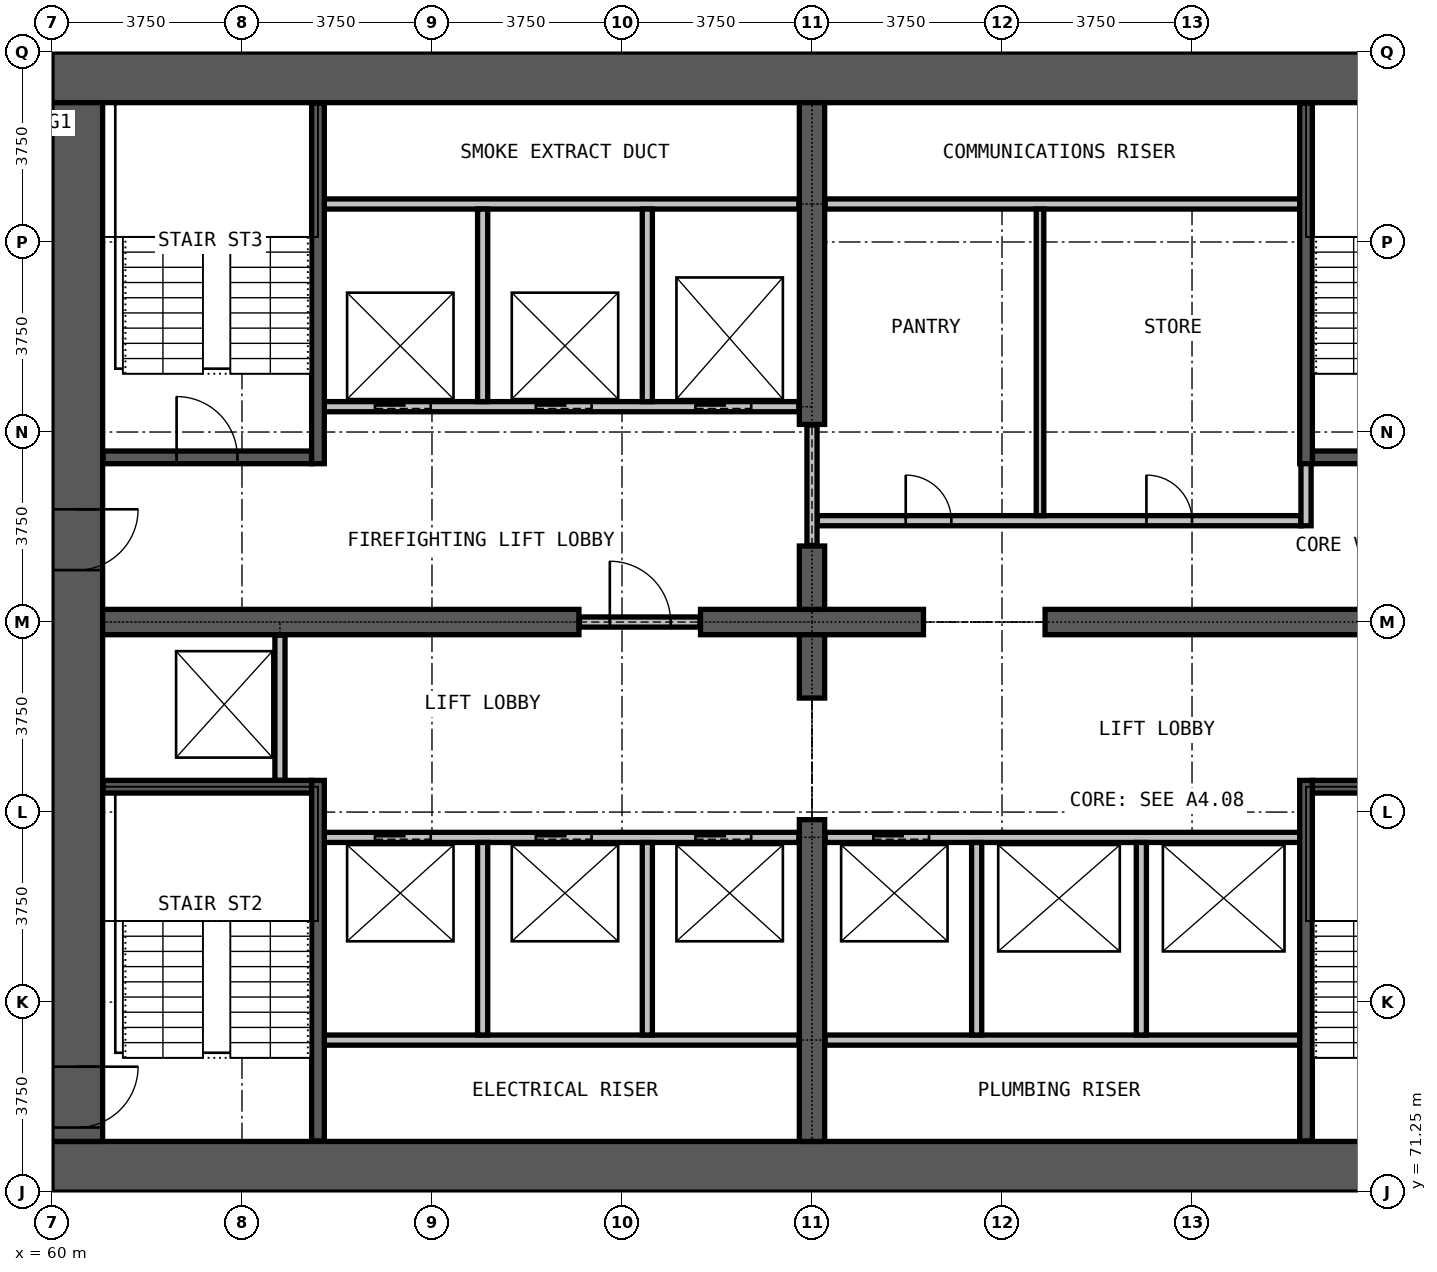
"""IFC4 building model, lengths in metres.
Left out: names, types, materials, properties, quantities, classifications, styles, units other than length and angle.
Written with IfcOpenShell. Run it as: python <this file> out.ifc"""

import sys

from ifc_helpers import new_model, si_unit, direction, frame, frame_2d, origin, place, context, subcontext, project, spatial, rectangle, extrude, element, fill, save


model = new_model("IFC4")
c1 = context("Model", 3, precision=1e-05, world=origin(), true_north=direction((0.0, 1.0)))
c2 = subcontext(c1, "Body", "Model", "MODEL_VIEW")
j1 = project(units=[si_unit("LENGTHUNIT", "METRE"), si_unit("PLANEANGLEUNIT", "RADIAN")], contexts=[c1])
p1 = place(None, origin())
s1 = spatial("IfcSite", under=j1, at=p1, CompositionType="ELEMENT")
p2 = place(p1, origin())
s2 = spatial("IfcBuilding", under=s1, at=p2, CompositionType="ELEMENT")
p3 = place(p2, frame((0.0, 0.0, 59.3)))
s3 = spatial("IfcBuildingStorey", under=s2, at=p3, CompositionType="ELEMENT", Elevation=59.3)
for number, where, z_axis, x_axis in (
    (1, (60.0, 71.75, 0.0), (0.0, 0.0, 1.0), (1.0, 0.0, 0.0)),
    (2, (90.0, 93.25, 0.0), (0.0, 0.0, 1.0), (-1.0, 0.0, 0.0)),
):
    element("IfcWall", number, at=place(p3, frame(where, z_axis=z_axis, x_axis=x_axis)), inside=s3, PredefinedType="SHEAR", context=c2, shape_type="SweptSolid", body=[
        extrude(rectangle(XDim=30.0, YDim=1.0, at=frame_2d((15.0, 0.0))), origin(), (0.0, 0.0, 1.0), 3.3),
    ])
p4 = place(p3, frame((60.5, 92.75, 0.0), z_axis=(0.0, 0.0, 1.0), x_axis=(0.0, -1.0, 0.0)))
e3 = element("IfcWall", 3, at=p4, inside=s3, PredefinedType="SHEAR", context=c2, shape_type="SweptSolid", body=[
    extrude(rectangle(XDim=20.5, YDim=1.0, at=frame_2d((10.25, 0.0))), origin(), (0.0, 0.0, 1.0), 3.3),
])
p5 = place(p4, frame((19.025, 0.0, 0.0)))
e4 = element("IfcOpeningElement", 4, at=p5, cuts=e3, PredefinedType="OPENING", context=c2, shape_type="SweptSolid", body=[
    extrude(rectangle(XDim=1.2, YDim=2.2, at=frame_2d((0.6, 1.1))), frame((0.0, 0.51, 0.0), z_axis=(0.0, -1.0, 0.0), x_axis=(1.0, 0.0, 0.0)), (0.0, 0.0, 1.0), 1.02),
])
p6 = place(p4, frame((8.025, 0.0, 0.0)))
e5 = element("IfcOpeningElement", 5, at=p6, cuts=e3, PredefinedType="OPENING", context=c2, shape_type="SweptSolid", body=[
    extrude(rectangle(XDim=1.2, YDim=2.2, at=frame_2d((0.6, 1.1))), frame((0.0, 0.51, 0.0), z_axis=(0.0, -1.0, 0.0), x_axis=(1.0, 0.0, 0.0)), (0.0, 0.0, 1.0), 1.02),
])
p7 = place(p3, frame((61.0, 82.5, 0.0), z_axis=(0.0, 0.0, 1.0), x_axis=(1.0, 0.0, 0.0)))
e6 = element("IfcWall", 6, at=p7, inside=s3, PredefinedType="SHEAR", context=c2, shape_type="SweptSolid", body=[
    extrude(rectangle(XDim=9.4, YDim=0.5, at=frame_2d((4.7, 0.0))), origin(), (0.0, 0.0, 1.0), 3.3),
])
p8 = place(p3, frame((72.8, 82.5, 0.0), z_axis=(0.0, 0.0, 1.0), x_axis=(1.0, 0.0, 0.0)))
e7 = element("IfcWall", 7, at=p8, inside=s3, PredefinedType="SHEAR", context=c2, shape_type="SweptSolid", body=[
    extrude(rectangle(XDim=4.4, YDim=0.5, at=frame_2d((2.2, 0.0))), origin(), (0.0, 0.0, 1.0), 3.3),
])
p9 = place(p3, frame((79.6, 82.5, 0.0), z_axis=(0.0, 0.0, 1.0), x_axis=(1.0, 0.0, 0.0)))
e8 = element("IfcWall", 8, at=p9, inside=s3, PredefinedType="SHEAR", context=c2, shape_type="SweptSolid", body=[
    extrude(rectangle(XDim=9.4, YDim=0.5, at=frame_2d((4.7, 0.0))), origin(), (0.0, 0.0, 1.0), 3.3),
])
p10 = place(p3, frame((75.0, 72.25, 0.0), z_axis=(0.0, 0.0, 1.0), x_axis=(0.0, 1.0, 0.0)))
e9 = element("IfcWall", 9, at=p10, inside=s3, PredefinedType="SHEAR", context=c2, shape_type="SweptSolid", body=[
    extrude(rectangle(XDim=6.35, YDim=0.5, at=frame_2d((3.175, 0.0))), origin(), (0.0, 0.0, 1.0), 3.3),
])
for number, where, z_axis, x_axis in (
    (10, (75.0, 81.0, 0.0), (0.0, 0.0, 1.0), (0.0, 1.0, 0.0)),
    (11, (75.0, 82.75, 0.0), (0.0, 0.0, 1.0), (0.0, 1.0, 0.0)),
):
    element("IfcWall", number, at=place(p3, frame(where, z_axis=z_axis, x_axis=x_axis)), inside=s3, PredefinedType="SHEAR", context=c2, shape_type="SweptSolid", body=[
        extrude(rectangle(XDim=1.25, YDim=0.5, at=frame_2d((0.625, 0.0))), origin(), (0.0, 0.0, 1.0), 3.3),
    ])
p11 = place(p3, frame((75.0, 86.4, 0.0), z_axis=(0.0, 0.0, 1.0), x_axis=(0.0, 1.0, 0.0)))
e12 = element("IfcWall", 12, at=p11, inside=s3, PredefinedType="SHEAR", context=c2, shape_type="SweptSolid", body=[
    extrude(rectangle(XDim=6.35, YDim=0.5, at=frame_2d((3.175, 0.0))), origin(), (0.0, 0.0, 1.0), 3.3),
])
p12 = place(p3, frame((70.41, 82.5, 0.0), z_axis=(0.0, 0.0, 1.0), x_axis=(1.0, 0.0, 0.0)))
e13 = element("IfcWall", 13, at=p12, inside=s3, PredefinedType="PARTITIONING", context=c2, shape_type="SweptSolid", body=[
    extrude(rectangle(XDim=2.38, YDim=0.2, at=frame_2d((1.19, 0.0))), origin(), (0.0, 0.0, 1.0), 2.4),
])
p13 = place(p12, frame((0.6, 0.0, 0.0)))
e14 = element("IfcOpeningElement", 14, at=p13, cuts=e13, PredefinedType="OPENING", context=c2, shape_type="SweptSolid", body=[
    extrude(rectangle(XDim=1.2, YDim=2.2, at=frame_2d((0.6, 1.1))), frame((0.0, 0.11, 0.0), z_axis=(0.0, -1.0, 0.0), x_axis=(1.0, 0.0, 0.0)), (0.0, 0.0, 1.0), 0.22),
])
p14 = place(p3, frame((75.1, 84.5, 0.0), z_axis=(0.0, 0.0, 1.0), x_axis=(1.0, 0.0, 0.0)))
e15 = element("IfcWall", 15, at=p14, inside=s3, PredefinedType="PARTITIONING", context=c2, shape_type="SweptSolid", body=[
    extrude(rectangle(XDim=9.55, YDim=0.2, at=frame_2d((4.775, 0.0))), origin(), (0.0, 0.0, 1.0), 3.0),
])
p15 = place(p14, frame((1.75, 0.0, 0.0)))
e16 = element("IfcOpeningElement", 16, at=p15, cuts=e15, PredefinedType="OPENING", context=c2, shape_type="SweptSolid", body=[
    extrude(rectangle(XDim=0.9, YDim=2.2, at=frame_2d((0.45, 1.1))), frame((0.0, 0.11, 0.0), z_axis=(0.0, -1.0, 0.0), x_axis=(1.0, 0.0, 0.0)), (0.0, 0.0, 1.0), 0.22),
])
p16 = place(p14, frame((6.5, 0.0, 0.0)))
e17 = element("IfcOpeningElement", 17, at=p16, cuts=e15, PredefinedType="OPENING", context=c2, shape_type="SweptSolid", body=[
    extrude(rectangle(XDim=0.9, YDim=2.2, at=frame_2d((0.45, 1.1))), frame((0.0, 0.11, 0.0), z_axis=(0.0, -1.0, 0.0), x_axis=(1.0, 0.0, 0.0)), (0.0, 0.0, 1.0), 0.22),
])
p17 = place(p3, frame((75.26, 90.75, 0.0), z_axis=(0.0, 0.0, 1.0), x_axis=(1.0, 0.0, 0.0)))
e18 = element("IfcWall", 18, at=p17, inside=s3, PredefinedType="PARTITIONING", context=c2, shape_type="SweptSolid", body=[
    extrude(rectangle(XDim=9.365, YDim=0.2, at=frame_2d((4.683, 0.0))), origin(), (0.0, 0.0, 1.0), 3.0),
])
p18 = place(p3, frame((75.0, 84.01, 0.0), z_axis=(0.0, 0.0, 1.0), x_axis=(0.0, 1.0, 0.0)))
e19 = element("IfcWall", 19, at=p18, inside=s3, PredefinedType="PARTITIONING", context=c2, shape_type="SweptSolid", body=[
    extrude(rectangle(XDim=2.38, YDim=0.2, at=frame_2d((1.19, 0.0))), origin(), (0.0, 0.0, 1.0), 2.4),
])
p19 = place(p3, frame((84.75, 84.4, 0.0), z_axis=(0.0, 0.0, 1.0), x_axis=(0.0, 1.0, 0.0)))
e20 = element("IfcWall", 20, at=p19, inside=s3, PredefinedType="PARTITIONING", context=c2, shape_type="SweptSolid", body=[
    extrude(rectangle(XDim=1.475, YDim=0.2, at=frame_2d((0.738, 0.0))), origin(), (0.0, 0.0, 1.0), 3.0),
])
p20 = place(p3, frame((79.5, 84.6, 0.0), z_axis=(0.0, 0.0, 1.0), x_axis=(0.0, 1.0, 0.0)))
e21 = element("IfcWall", 21, at=p20, inside=s3, PredefinedType="PARTITIONING", context=c2, shape_type="SweptSolid", body=[
    extrude(rectangle(XDim=6.05, YDim=0.15, at=frame_2d((3.025, 0.0))), origin(), (0.0, 0.0, 1.0), 3.0),
])
for number, where, z_axis, x_axis in (
    (22, (65.375, 74.25, 0.0), (0.0, 0.0, 1.0), (1.0, 0.0, 0.0)),
    (23, (75.26, 74.25, 0.0), (0.0, 0.0, 1.0), (1.0, 0.0, 0.0)),
):
    element("IfcWall", number, at=place(p3, frame(where, z_axis=z_axis, x_axis=x_axis)), inside=s3, PredefinedType="PARTITIONING", context=c2, shape_type="SweptSolid", body=[
        extrude(rectangle(XDim=9.365, YDim=0.2, at=frame_2d((4.683, 0.0))), origin(), (0.0, 0.0, 1.0), 3.0),
    ])
p21 = place(p3, frame((65.375, 78.25, 0.0), z_axis=(0.0, 0.0, 1.0), x_axis=(1.0, 0.0, 0.0)))
e24 = element("IfcWall", 24, at=p21, inside=s3, PredefinedType="PARTITIONING", context=c2, shape_type="SweptSolid", body=[
    extrude(rectangle(XDim=9.365, YDim=0.2, at=frame_2d((4.683, 0.0))), origin(), (0.0, 0.0, 1.0), 3.0),
])
p22 = place(p21, frame((1.0, 0.0, 0.0)))
e25 = element("IfcOpeningElement", 25, at=p22, cuts=e24, PredefinedType="OPENING", context=c2, shape_type="SweptSolid", body=[
    extrude(rectangle(XDim=1.1, YDim=2.2, at=frame_2d((0.55, 1.1))), frame((0.0, 0.11, 0.0), z_axis=(0.0, -1.0, 0.0), x_axis=(1.0, 0.0, 0.0)), (0.0, 0.0, 1.0), 0.22),
])
p23 = place(p21, frame((4.175, 0.0, 0.0)))
e26 = element("IfcOpeningElement", 26, at=p23, cuts=e24, PredefinedType="OPENING", context=c2, shape_type="SweptSolid", body=[
    extrude(rectangle(XDim=1.1, YDim=2.2, at=frame_2d((0.55, 1.1))), frame((0.0, 0.11, 0.0), z_axis=(0.0, -1.0, 0.0), x_axis=(1.0, 0.0, 0.0)), (0.0, 0.0, 1.0), 0.22),
])
p24 = place(p21, frame((7.325, 0.0, 0.0)))
e27 = element("IfcOpeningElement", 27, at=p24, cuts=e24, PredefinedType="OPENING", context=c2, shape_type="SweptSolid", body=[
    extrude(rectangle(XDim=1.1, YDim=2.2, at=frame_2d((0.55, 1.1))), frame((0.0, 0.11, 0.0), z_axis=(0.0, -1.0, 0.0), x_axis=(1.0, 0.0, 0.0)), (0.0, 0.0, 1.0), 0.22),
])
p25 = place(p3, frame((75.26, 78.25, 0.0), z_axis=(0.0, 0.0, 1.0), x_axis=(1.0, 0.0, 0.0)))
e28 = element("IfcWall", 28, at=p25, inside=s3, PredefinedType="PARTITIONING", context=c2, shape_type="SweptSolid", body=[
    extrude(rectangle(XDim=9.365, YDim=0.2, at=frame_2d((4.683, 0.0))), origin(), (0.0, 0.0, 1.0), 3.0),
])
p26 = place(p25, frame((0.95, 0.0, 0.0)))
e29 = element("IfcOpeningElement", 29, at=p26, cuts=e28, PredefinedType="OPENING", context=c2, shape_type="SweptSolid", body=[
    extrude(rectangle(XDim=1.1, YDim=2.2, at=frame_2d((0.55, 1.1))), frame((0.0, 0.11, 0.0), z_axis=(0.0, -1.0, 0.0), x_axis=(1.0, 0.0, 0.0)), (0.0, 0.0, 1.0), 0.22),
])
p27 = place(p3, frame((65.375, 86.75, 0.0), z_axis=(0.0, 0.0, 1.0), x_axis=(1.0, 0.0, 0.0)))
e30 = element("IfcWall", 30, at=p27, inside=s3, PredefinedType="PARTITIONING", context=c2, shape_type="SweptSolid", body=[
    extrude(rectangle(XDim=9.365, YDim=0.2, at=frame_2d((4.683, 0.0))), origin(), (0.0, 0.0, 1.0), 3.0),
])
p28 = place(p27, frame((1.0, 0.0, 0.0)))
e31 = element("IfcOpeningElement", 31, at=p28, cuts=e30, PredefinedType="OPENING", context=c2, shape_type="SweptSolid", body=[
    extrude(rectangle(XDim=1.1, YDim=2.2, at=frame_2d((0.55, 1.1))), frame((0.0, 0.11, 0.0), z_axis=(0.0, -1.0, 0.0), x_axis=(1.0, 0.0, 0.0)), (0.0, 0.0, 1.0), 0.22),
])
p29 = place(p27, frame((4.175, 0.0, 0.0)))
e32 = element("IfcOpeningElement", 32, at=p29, cuts=e30, PredefinedType="OPENING", context=c2, shape_type="SweptSolid", body=[
    extrude(rectangle(XDim=1.1, YDim=2.2, at=frame_2d((0.55, 1.1))), frame((0.0, 0.11, 0.0), z_axis=(0.0, -1.0, 0.0), x_axis=(1.0, 0.0, 0.0)), (0.0, 0.0, 1.0), 0.22),
])
p30 = place(p27, frame((7.325, 0.0, 0.0)))
e33 = element("IfcOpeningElement", 33, at=p30, cuts=e30, PredefinedType="OPENING", context=c2, shape_type="SweptSolid", body=[
    extrude(rectangle(XDim=1.1, YDim=2.2, at=frame_2d((0.55, 1.1))), frame((0.0, 0.11, 0.0), z_axis=(0.0, -1.0, 0.0), x_axis=(1.0, 0.0, 0.0)), (0.0, 0.0, 1.0), 0.22),
])
p31 = place(p3, frame((65.375, 90.75, 0.0), z_axis=(0.0, 0.0, 1.0), x_axis=(1.0, 0.0, 0.0)))
e34 = element("IfcWall", 34, at=p31, inside=s3, PredefinedType="PARTITIONING", context=c2, shape_type="SweptSolid", body=[
    extrude(rectangle(XDim=9.365, YDim=0.2, at=frame_2d((4.683, 0.0))), origin(), (0.0, 0.0, 1.0), 3.0),
])
p32 = place(p3, frame((64.5, 79.375, 0.0), z_axis=(0.0, 0.0, 1.0), x_axis=(0.0, 1.0, 0.0)))
e35 = element("IfcWall", 35, at=p32, inside=s3, PredefinedType="PARTITIONING", context=c2, shape_type="SweptSolid", body=[
    extrude(rectangle(XDim=2.865, YDim=0.2, at=frame_2d((1.433, 0.0))), origin(), (0.0, 0.0, 1.0), 3.0),
])
for number, where, z_axis, x_axis in (
    (36, (68.5, 74.35, 0.0), (0.0, 0.0, 1.0), (0.0, 1.0, 0.0)),
    (37, (68.5, 86.85, 0.0), (0.0, 0.0, 1.0), (0.0, 1.0, 0.0)),
    (38, (71.75, 74.35, 0.0), (0.0, 0.0, 1.0), (0.0, 1.0, 0.0)),
    (39, (71.75, 86.85, 0.0), (0.0, 0.0, 1.0), (0.0, 1.0, 0.0)),
    (40, (78.25, 74.35, 0.0), (0.0, 0.0, 1.0), (0.0, 1.0, 0.0)),
    (41, (81.5, 74.35, 0.0), (0.0, 0.0, 1.0), (0.0, 1.0, 0.0)),
):
    element("IfcWall", number, at=place(p3, frame(where, z_axis=z_axis, x_axis=x_axis)), inside=s3, PredefinedType="PARTITIONING", context=c2, shape_type="SweptSolid", body=[
        extrude(rectangle(XDim=3.8, YDim=0.2, at=frame_2d((1.9, 0.0))), origin(), (0.0, 0.0, 1.0), 3.0),
    ])
for number, where, z_axis, x_axis in (
    (42, (61.01, 79.25, 0.0), (0.0, 0.0, 1.0), (1.0, 0.0, 0.0)),
    (43, (84.875, 79.25, 0.0), (0.0, 0.0, 1.0), (1.0, 0.0, 0.0)),
):
    element("IfcWall", number, at=place(p3, frame(where, z_axis=z_axis, x_axis=x_axis)), inside=s3, PredefinedType="PARTITIONING", context=c2, shape_type="SweptSolid", body=[
        extrude(rectangle(XDim=4.115, YDim=0.25, at=frame_2d((2.058, 0.0))), origin(), (0.0, 0.0, 1.0), 3.0),
    ])
p33 = place(p3, frame((61.01, 85.75, 0.0), z_axis=(0.0, 0.0, 1.0), x_axis=(1.0, 0.0, 0.0)))
e44 = element("IfcWall", 44, at=p33, inside=s3, PredefinedType="PARTITIONING", context=c2, shape_type="SweptSolid", body=[
    extrude(rectangle(XDim=4.115, YDim=0.25, at=frame_2d((2.058, 0.0))), origin(), (0.0, 0.0, 1.0), 3.0),
])
p34 = place(p33, frame((1.45, 0.0, 0.0)))
e45 = element("IfcOpeningElement", 45, at=p34, cuts=e44, PredefinedType="OPENING", context=c2, shape_type="SweptSolid", body=[
    extrude(rectangle(XDim=1.2, YDim=2.2, at=frame_2d((0.6, 1.1))), frame((0.0, 0.135, 0.0), z_axis=(0.0, -1.0, 0.0), x_axis=(1.0, 0.0, 0.0)), (0.0, 0.0, 1.0), 0.27),
])
p35 = place(p3, frame((84.875, 85.75, 0.0), z_axis=(0.0, 0.0, 1.0), x_axis=(1.0, 0.0, 0.0)))
e46 = element("IfcWall", 46, at=p35, inside=s3, PredefinedType="PARTITIONING", context=c2, shape_type="SweptSolid", body=[
    extrude(rectangle(XDim=4.115, YDim=0.25, at=frame_2d((2.058, 0.0))), origin(), (0.0, 0.0, 1.0), 3.0),
])
for number, where, z_axis, x_axis in (
    (47, (65.25, 72.26, 0.0), (0.0, 0.0, 1.0), (0.0, 1.0, 0.0)),
    (48, (65.25, 85.625, 0.0), (0.0, 0.0, 1.0), (0.0, 1.0, 0.0)),
    (49, (84.75, 72.26, 0.0), (0.0, 0.0, 1.0), (0.0, 1.0, 0.0)),
    (50, (84.75, 85.625, 0.0), (0.0, 0.0, 1.0), (0.0, 1.0, 0.0)),
):
    element("IfcWall", number, at=place(p3, frame(where, z_axis=z_axis, x_axis=x_axis)), inside=s3, PredefinedType="PARTITIONING", context=c2, shape_type="SweptSolid", body=[
        extrude(rectangle(XDim=7.115, YDim=0.25, at=frame_2d((3.558, 0.0))), origin(), (0.0, 0.0, 1.0), 3.0),
    ])
p36 = place(p22, origin())
e51 = element("IfcDoor", 51, at=p36, inside=s3, OperationType="DOUBLE_DOOR_SLIDING", PredefinedType="DOOR", context=c2, shape_type="SweptSolid", body=[
    extrude(rectangle(XDim=1.1, YDim=2.2, at=frame_2d((0.55, 1.1))), frame((0.0, 0.025, 0.0), z_axis=(0.0, -1.0, 0.0), x_axis=(1.0, 0.0, 0.0)), (0.0, 0.0, 1.0), 0.05),
])
fill(e25, e51)
p37 = place(p23, origin())
e52 = element("IfcDoor", 52, at=p37, inside=s3, OperationType="DOUBLE_DOOR_SLIDING", PredefinedType="DOOR", context=c2, shape_type="SweptSolid", body=[
    extrude(rectangle(XDim=1.1, YDim=2.2, at=frame_2d((0.55, 1.1))), frame((0.0, 0.025, 0.0), z_axis=(0.0, -1.0, 0.0), x_axis=(1.0, 0.0, 0.0)), (0.0, 0.0, 1.0), 0.05),
])
fill(e26, e52)
p38 = place(p24, origin())
e53 = element("IfcDoor", 53, at=p38, inside=s3, OperationType="DOUBLE_DOOR_SLIDING", PredefinedType="DOOR", context=c2, shape_type="SweptSolid", body=[
    extrude(rectangle(XDim=1.1, YDim=2.2, at=frame_2d((0.55, 1.1))), frame((0.0, 0.025, 0.0), z_axis=(0.0, -1.0, 0.0), x_axis=(1.0, 0.0, 0.0)), (0.0, 0.0, 1.0), 0.05),
])
fill(e27, e53)
p39 = place(p26, origin())
e54 = element("IfcDoor", 54, at=p39, inside=s3, OperationType="DOUBLE_DOOR_SLIDING", PredefinedType="DOOR", context=c2, shape_type="SweptSolid", body=[
    extrude(rectangle(XDim=1.1, YDim=2.2, at=frame_2d((0.55, 1.1))), frame((0.0, 0.025, 0.0), z_axis=(0.0, -1.0, 0.0), x_axis=(1.0, 0.0, 0.0)), (0.0, 0.0, 1.0), 0.05),
])
fill(e29, e54)
p40 = place(p28, origin())
e55 = element("IfcDoor", 55, at=p40, inside=s3, OperationType="DOUBLE_DOOR_SLIDING", PredefinedType="DOOR", context=c2, shape_type="SweptSolid", body=[
    extrude(rectangle(XDim=1.1, YDim=2.2, at=frame_2d((0.55, 1.1))), frame((0.0, 0.025, 0.0), z_axis=(0.0, -1.0, 0.0), x_axis=(1.0, 0.0, 0.0)), (0.0, 0.0, 1.0), 0.05),
])
fill(e31, e55)
p41 = place(p29, origin())
e56 = element("IfcDoor", 56, at=p41, inside=s3, OperationType="DOUBLE_DOOR_SLIDING", PredefinedType="DOOR", context=c2, shape_type="SweptSolid", body=[
    extrude(rectangle(XDim=1.1, YDim=2.2, at=frame_2d((0.55, 1.1))), frame((0.0, 0.025, 0.0), z_axis=(0.0, -1.0, 0.0), x_axis=(1.0, 0.0, 0.0)), (0.0, 0.0, 1.0), 0.05),
])
fill(e32, e56)
p42 = place(p30, origin())
e57 = element("IfcDoor", 57, at=p42, inside=s3, OperationType="DOUBLE_DOOR_SLIDING", PredefinedType="DOOR", context=c2, shape_type="SweptSolid", body=[
    extrude(rectangle(XDim=1.1, YDim=2.2, at=frame_2d((0.55, 1.1))), frame((0.0, 0.025, 0.0), z_axis=(0.0, -1.0, 0.0), x_axis=(1.0, 0.0, 0.0)), (0.0, 0.0, 1.0), 0.05),
])
fill(e33, e57)
p43 = place(p13, origin())
e58 = element("IfcDoor", 58, at=p43, inside=s3, OperationType="SINGLE_SWING_RIGHT", PredefinedType="DOOR", context=c2, shape_type="SweptSolid", body=[
    extrude(rectangle(XDim=1.2, YDim=2.2, at=frame_2d((0.6, 1.1))), frame((0.0, 0.025, 0.0), z_axis=(0.0, -1.0, 0.0), x_axis=(1.0, 0.0, 0.0)), (0.0, 0.0, 1.0), 0.05),
])
fill(e14, e58)
p44 = place(p34, origin())
e59 = element("IfcDoor", 59, at=p44, inside=s3, OperationType="SINGLE_SWING_LEFT", PredefinedType="DOOR", context=c2, shape_type="SweptSolid", body=[
    extrude(rectangle(XDim=1.2, YDim=2.2, at=frame_2d((0.6, 1.1))), frame((0.0, 0.025, 0.0), z_axis=(0.0, -1.0, 0.0), x_axis=(1.0, 0.0, 0.0)), (0.0, 0.0, 1.0), 0.05),
])
fill(e45, e59)
p45 = place(p5, origin())
e60 = element("IfcDoor", 60, at=p45, inside=s3, OperationType="SINGLE_SWING_LEFT", PredefinedType="DOOR", context=c2, shape_type="SweptSolid", body=[
    extrude(rectangle(XDim=1.2, YDim=2.2, at=frame_2d((0.6, 1.1))), frame((0.0, 0.025, 0.0), z_axis=(0.0, -1.0, 0.0), x_axis=(1.0, 0.0, 0.0)), (0.0, 0.0, 1.0), 0.05),
])
fill(e4, e60)
p46 = place(p6, origin())
e61 = element("IfcDoor", 61, at=p46, inside=s3, OperationType="SINGLE_SWING_LEFT", PredefinedType="DOOR", context=c2, shape_type="SweptSolid", body=[
    extrude(rectangle(XDim=1.2, YDim=2.2, at=frame_2d((0.6, 1.1))), frame((0.0, 0.025, 0.0), z_axis=(0.0, -1.0, 0.0), x_axis=(1.0, 0.0, 0.0)), (0.0, 0.0, 1.0), 0.05),
])
fill(e5, e61)
p47 = place(p15, origin())
e62 = element("IfcDoor", 62, at=p47, inside=s3, OperationType="SINGLE_SWING_RIGHT", PredefinedType="DOOR", context=c2, shape_type="SweptSolid", body=[
    extrude(rectangle(XDim=0.9, YDim=2.2, at=frame_2d((0.45, 1.1))), frame((0.0, 0.025, 0.0), z_axis=(0.0, -1.0, 0.0), x_axis=(1.0, 0.0, 0.0)), (0.0, 0.0, 1.0), 0.05),
])
fill(e16, e62)
p48 = place(p16, origin())
e63 = element("IfcDoor", 63, at=p48, inside=s3, OperationType="SINGLE_SWING_RIGHT", PredefinedType="DOOR", context=c2, shape_type="SweptSolid", body=[
    extrude(rectangle(XDim=0.9, YDim=2.2, at=frame_2d((0.45, 1.1))), frame((0.0, 0.025, 0.0), z_axis=(0.0, -1.0, 0.0), x_axis=(1.0, 0.0, 0.0)), (0.0, 0.0, 1.0), 0.05),
])
fill(e17, e63)
save(model, sys.argv[1])
